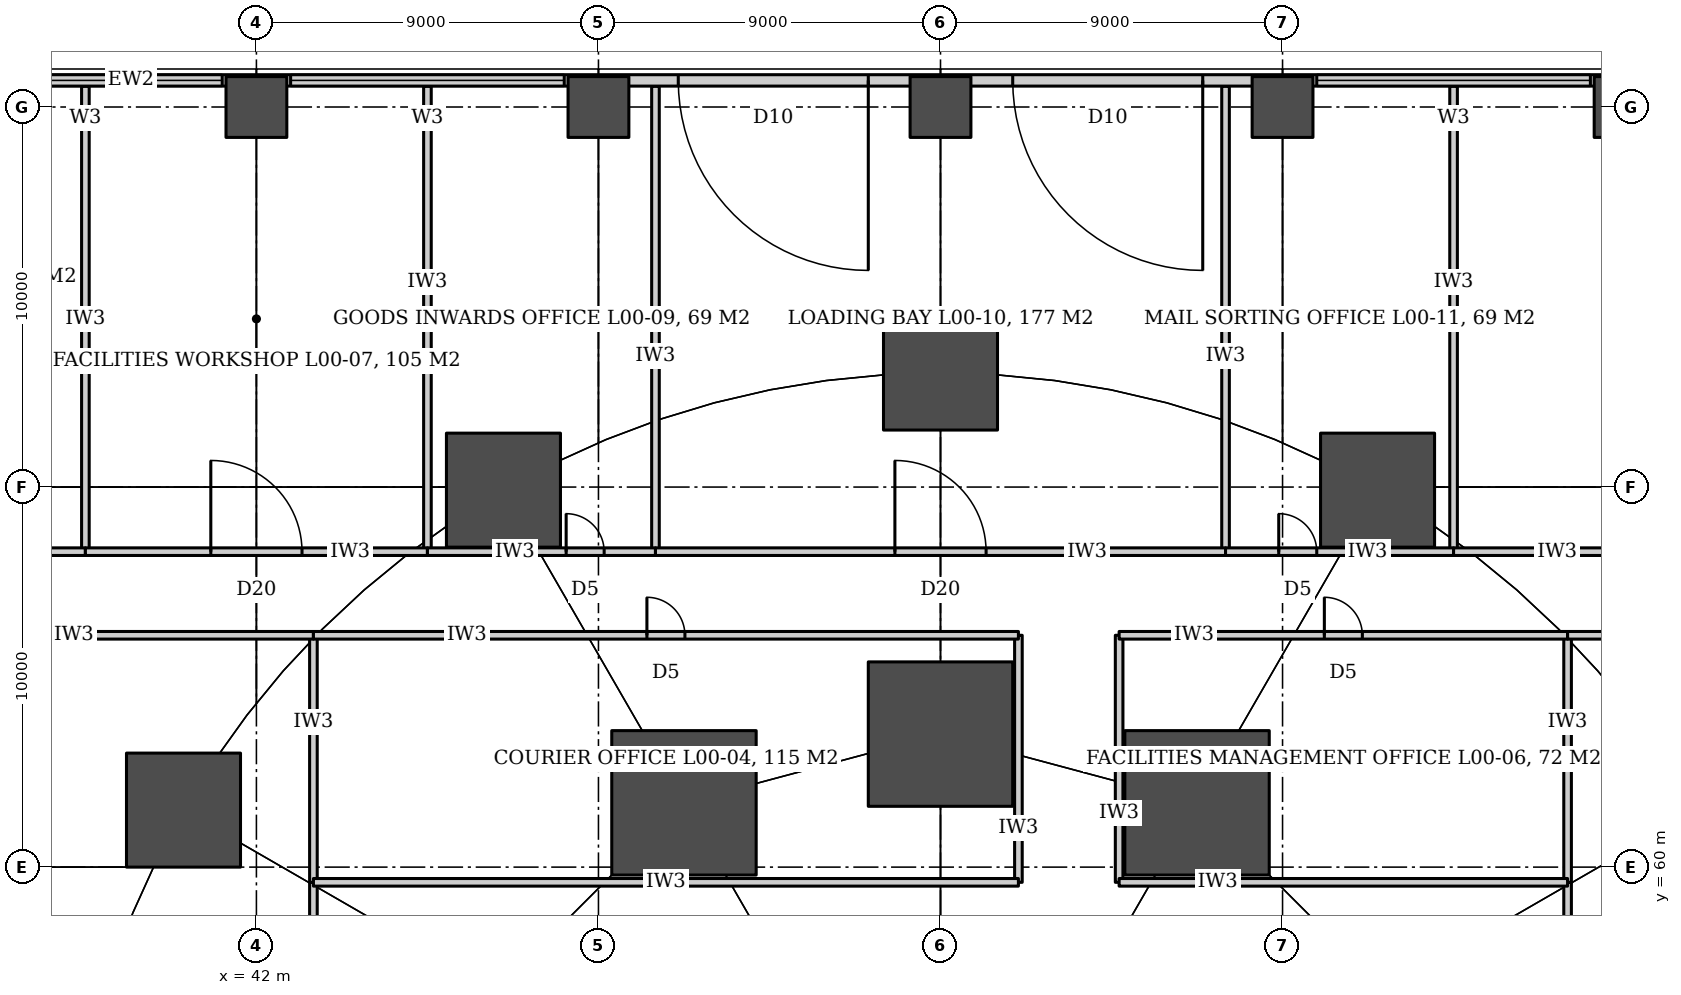
"""IFC4 building model, lengths in metres.
Left out: names, types, materials, properties, quantities, classifications, styles, units other than length and angle.
Written with IfcOpenShell. Run it as: python <this file> out.ifc"""

import sys

from ifc_helpers import new_model, si_unit, direction, frame, frame_2d, origin, origin_2d, place, context, subcontext, project, spatial, rectangle, circle, extrude, element, fill, save


model = new_model("IFC4")
c1 = context("Model", 3, precision=1e-05, world=origin(), true_north=direction((0.0, 1.0)))
c2 = subcontext(c1, "Body", "Model", "MODEL_VIEW")
j1 = project(units=[si_unit("LENGTHUNIT", "METRE"), si_unit("PLANEANGLEUNIT", "RADIAN")], contexts=[c1])
p1 = place(None, origin())
s1 = spatial("IfcSite", under=j1, at=p1, CompositionType="ELEMENT")
p2 = place(p1, origin())
s2 = spatial("IfcBuilding", under=s1, at=p2, CompositionType="ELEMENT")
p3 = place(p2, origin())
s3 = spatial("IfcBuildingStorey", under=s2, at=p3, CompositionType="ELEMENT", Elevation=0.0)
for number, where, z_axis, x_axis in (
    (1, (42.0, 80.0, 0.0), (0.0, 0.0, 1.0), (1.0, 0.0, 0.0)),
    (2, (51.0, 80.0, 0.0), (0.0, 0.0, 1.0), (1.0, 0.0, 0.0)),
    (3, (60.0, 80.0, 0.0), (0.0, 0.0, 1.0), (1.0, 0.0, 0.0)),
    (4, (69.0, 80.0, 0.0), (0.0, 0.0, 1.0), (1.0, 0.0, 0.0)),
    (5, (78.0, 80.0, 0.0), (0.0, 0.0, 1.0), (1.0, 0.0, 0.0)),
):
    element("IfcColumn", number, at=place(p3, frame(where, z_axis=z_axis, x_axis=x_axis)), inside=s3, PredefinedType="COLUMN", context=c2, shape_type="SweptSolid", body=[
        extrude(rectangle(XDim=1.6, YDim=1.6, at=origin_2d()), origin(), (0.0, 0.0, 1.0), 6.0),
    ])
for number, where, z_axis, x_axis in (
    (6, (71.5, 69.919, 0.0), (0.0, 0.0, 1.0), (1.0, 0.0, 0.0)),
    (7, (60.0, 73.0, 0.0), (0.0, 0.0, 1.0), (1.0, 0.0, 0.0)),
    (8, (48.5, 69.919, 0.0), (0.0, 0.0, 1.0), (1.0, 0.0, 0.0)),
    (9, (40.081, 61.5, 0.0), (0.0, 0.0, 1.0), (1.0, 0.0, 0.0)),
):
    element("IfcColumn", number, at=place(p3, frame(where, z_axis=z_axis, x_axis=x_axis)), inside=s3, PredefinedType="COLUMN", context=c2, shape_type="SweptSolid", body=[
        extrude(circle(Radius=1.5, at=origin_2d()), origin(), (0.0, 0.0, 1.0), 6.0),
    ])
for number, where, z_axis, x_axis in (
    (10, (66.75, 61.691, 0.0), (0.0, 0.0, 1.0), (1.0, 0.0, 0.0)),
    (11, (60.0, 63.5, 0.0), (0.0, 0.0, 1.0), (1.0, 0.0, 0.0)),
    (12, (53.25, 61.691, 0.0), (0.0, 0.0, 1.0), (1.0, 0.0, 0.0)),
):
    element("IfcColumn", number, at=place(p3, frame(where, z_axis=z_axis, x_axis=x_axis)), inside=s3, PredefinedType="COLUMN", context=c2, shape_type="SweptSolid", body=[
        extrude(circle(Radius=1.9, at=origin_2d()), origin(), (0.0, 0.0, 1.0), 6.0),
    ])
p4 = place(p3, frame((37.5, 68.3, 0.0), z_axis=(0.0, 0.0, 1.0), x_axis=(0.0, 1.0, 0.0)))
e13 = element("IfcWall", 13, at=p4, inside=s3, PredefinedType="PARTITIONING", context=c2, shape_type="SweptSolid", body=[
    extrude(rectangle(XDim=12.245, YDim=0.2, at=frame_2d((6.123, 0.0))), origin(), (0.0, 0.0, 1.0), 3.68),
])
p5 = place(p3, frame((43.5, 48.35, 0.0), z_axis=(0.0, 0.0, 1.0), x_axis=(0.0, 1.0, 0.0)))
e14 = element("IfcWall", 14, at=p5, inside=s3, PredefinedType="PARTITIONING", context=c2, shape_type="SweptSolid", body=[
    extrude(rectangle(XDim=11.25, YDim=0.2, at=frame_2d((5.625, 0.0))), origin(), (0.0, 0.0, 1.0), 3.08),
])
p6 = place(p3, frame((43.5, 59.6, 0.0), z_axis=(0.0, 0.0, 1.0), x_axis=(0.0, 1.0, 0.0)))
e15 = element("IfcWall", 15, at=p6, inside=s3, PredefinedType="PARTITIONING", context=c2, shape_type="SweptSolid", body=[
    extrude(rectangle(XDim=6.5, YDim=0.2, at=frame_2d((3.25, 0.0))), origin(), (0.0, 0.0, 1.0), 3.08),
])
for number, where, z_axis, x_axis in (
    (16, (46.5, 68.3, 0.0), (0.0, 0.0, 1.0), (0.0, 1.0, 0.0)),
    (17, (52.5, 68.3, 0.0), (0.0, 0.0, 1.0), (0.0, 1.0, 0.0)),
):
    element("IfcWall", number, at=place(p3, frame(where, z_axis=z_axis, x_axis=x_axis)), inside=s3, PredefinedType="PARTITIONING", context=c2, shape_type="SweptSolid", body=[
        extrude(rectangle(XDim=12.245, YDim=0.2, at=frame_2d((6.123, 0.0))), origin(), (0.0, 0.0, 1.0), 3.68),
    ])
p7 = place(p3, frame((62.05, 59.6, 0.0), z_axis=(0.0, 0.0, 1.0), x_axis=(0.0, 1.0, 0.0)))
e18 = element("IfcWall", 18, at=p7, inside=s3, PredefinedType="PARTITIONING", context=c2, shape_type="SweptSolid", body=[
    extrude(rectangle(XDim=6.5, YDim=0.2, at=frame_2d((3.25, 0.0))), origin(), (0.0, 0.0, 1.0), 3.08),
])
p8 = place(p3, frame((64.7, 59.6, 0.0), z_axis=(0.0, 0.0, 1.0), x_axis=(0.0, 1.0, 0.0)))
e19 = element("IfcWall", 19, at=p8, inside=s3, PredefinedType="PARTITIONING", context=c2, shape_type="SweptSolid", body=[
    extrude(rectangle(XDim=6.5, YDim=0.2, at=frame_2d((3.25, 0.0))), origin(), (0.0, 0.0, 1.0), 2.48),
])
for number, where, z_axis, x_axis in (
    (20, (67.5, 68.3, 0.0), (0.0, 0.0, 1.0), (0.0, 1.0, 0.0)),
    (21, (73.5, 68.3, 0.0), (0.0, 0.0, 1.0), (0.0, 1.0, 0.0)),
):
    element("IfcWall", number, at=place(p3, frame(where, z_axis=z_axis, x_axis=x_axis)), inside=s3, PredefinedType="PARTITIONING", context=c2, shape_type="SweptSolid", body=[
        extrude(rectangle(XDim=12.245, YDim=0.2, at=frame_2d((6.123, 0.0))), origin(), (0.0, 0.0, 1.0), 3.68),
    ])
p9 = place(p3, frame((76.5, 48.35, 0.0), z_axis=(0.0, 0.0, 1.0), x_axis=(0.0, 1.0, 0.0)))
e22 = element("IfcWall", 22, at=p9, inside=s3, PredefinedType="PARTITIONING", context=c2, shape_type="SweptSolid", body=[
    extrude(rectangle(XDim=11.25, YDim=0.2, at=frame_2d((5.625, 0.0))), origin(), (0.0, 0.0, 1.0), 3.08),
])
p10 = place(p3, frame((76.5, 59.6, 0.0), z_axis=(0.0, 0.0, 1.0), x_axis=(0.0, 1.0, 0.0)))
e23 = element("IfcWall", 23, at=p10, inside=s3, PredefinedType="PARTITIONING", context=c2, shape_type="SweptSolid", body=[
    extrude(rectangle(XDim=6.5, YDim=0.2, at=frame_2d((3.25, 0.0))), origin(), (0.0, 0.0, 1.0), 3.08),
])
p11 = place(p3, frame((43.5, 59.6, 0.0), z_axis=(0.0, 0.0, 1.0), x_axis=(1.0, 0.0, 0.0)))
e24 = element("IfcWall", 24, at=p11, inside=s3, PredefinedType="PARTITIONING", context=c2, shape_type="SweptSolid", body=[
    extrude(rectangle(XDim=18.55, YDim=0.2, at=frame_2d((9.275, 0.0))), origin(), (0.0, 0.0, 1.0), 2.48),
])
p12 = place(p3, frame((64.7, 59.6, 0.0), z_axis=(0.0, 0.0, 1.0), x_axis=(1.0, 0.0, 0.0)))
e25 = element("IfcWall", 25, at=p12, inside=s3, PredefinedType="PARTITIONING", context=c2, shape_type="SweptSolid", body=[
    extrude(rectangle(XDim=11.8, YDim=0.2, at=frame_2d((5.9, 0.0))), origin(), (0.0, 0.0, 1.0), 2.48),
])
p13 = place(p3, frame((30.9, 66.1, 0.0), z_axis=(0.0, 0.0, 1.0), x_axis=(1.0, 0.0, 0.0)))
e26 = element("IfcWall", 26, at=p13, inside=s3, PredefinedType="PARTITIONING", context=c2, shape_type="SweptSolid", body=[
    extrude(rectangle(XDim=12.6, YDim=0.2, at=frame_2d((6.3, 0.0))), origin(), (0.0, 0.0, 1.0), 3.68),
])
p14 = place(p3, frame((43.5, 66.1, 0.0), z_axis=(0.0, 0.0, 1.0), x_axis=(1.0, 0.0, 0.0)))
e27 = element("IfcWall", 27, at=p14, inside=s3, PredefinedType="PARTITIONING", context=c2, shape_type="SweptSolid", body=[
    extrude(rectangle(XDim=18.55, YDim=0.2, at=frame_2d((9.275, 0.0))), origin(), (0.0, 0.0, 1.0), 3.08),
])
p15 = place(p14, frame((8.775, 0.0, 0.0)))
e28 = element("IfcOpeningElement", 28, at=p15, cuts=e27, PredefinedType="OPENING", context=c2, shape_type="SweptSolid", body=[
    extrude(rectangle(XDim=1.0, YDim=2.1, at=frame_2d((0.5, 1.05))), frame((0.0, 0.11, 0.0), z_axis=(0.0, -1.0, 0.0), x_axis=(1.0, 0.0, 0.0)), (0.0, 0.0, 1.0), 0.22),
])
p16 = place(p3, frame((64.7, 66.1, 0.0), z_axis=(0.0, 0.0, 1.0), x_axis=(1.0, 0.0, 0.0)))
e29 = element("IfcWall", 29, at=p16, inside=s3, PredefinedType="PARTITIONING", context=c2, shape_type="SweptSolid", body=[
    extrude(rectangle(XDim=11.8, YDim=0.2, at=frame_2d((5.9, 0.0))), origin(), (0.0, 0.0, 1.0), 3.08),
])
p17 = place(p16, frame((5.4, 0.0, 0.0)))
e30 = element("IfcOpeningElement", 30, at=p17, cuts=e29, PredefinedType="OPENING", context=c2, shape_type="SweptSolid", body=[
    extrude(rectangle(XDim=1.0, YDim=2.1, at=frame_2d((0.5, 1.05))), frame((0.0, 0.11, 0.0), z_axis=(0.0, -1.0, 0.0), x_axis=(1.0, 0.0, 0.0)), (0.0, 0.0, 1.0), 0.22),
])
p18 = place(p3, frame((76.5, 66.1, 0.0), z_axis=(0.0, 0.0, 1.0), x_axis=(1.0, 0.0, 0.0)))
e31 = element("IfcWall", 31, at=p18, inside=s3, PredefinedType="PARTITIONING", context=c2, shape_type="SweptSolid", body=[
    extrude(rectangle(XDim=12.6, YDim=0.2, at=frame_2d((6.3, 0.0))), origin(), (0.0, 0.0, 1.0), 3.68),
])
p19 = place(p3, frame((28.5, 68.3, 0.0), z_axis=(0.0, 0.0, 1.0), x_axis=(1.0, 0.0, 0.0)))
e32 = element("IfcWall", 32, at=p19, inside=s3, PredefinedType="PARTITIONING", context=c2, shape_type="SweptSolid", body=[
    extrude(rectangle(XDim=9.0, YDim=0.2, at=frame_2d((4.5, 0.0))), origin(), (0.0, 0.0, 1.0), 3.68),
])
p20 = place(p19, frame((5.4, 0.0, 0.0)))
e33 = element("IfcOpeningElement", 33, at=p20, cuts=e32, PredefinedType="OPENING", context=c2, shape_type="SweptSolid", body=[
    extrude(rectangle(XDim=1.0, YDim=2.1, at=frame_2d((0.5, 1.05))), frame((0.0, 0.11, 0.0), z_axis=(0.0, -1.0, 0.0), x_axis=(1.0, 0.0, 0.0)), (0.0, 0.0, 1.0), 0.22),
])
p21 = place(p3, frame((37.5, 68.3, 0.0), z_axis=(0.0, 0.0, 1.0), x_axis=(1.0, 0.0, 0.0)))
e34 = element("IfcWall", 34, at=p21, inside=s3, PredefinedType="PARTITIONING", context=c2, shape_type="SweptSolid", body=[
    extrude(rectangle(XDim=9.0, YDim=0.2, at=frame_2d((4.5, 0.0))), origin(), (0.0, 0.0, 1.0), 3.68),
])
p22 = place(p21, frame((3.3, 0.0, 0.0)))
e35 = element("IfcOpeningElement", 35, at=p22, cuts=e34, PredefinedType="OPENING", context=c2, shape_type="SweptSolid", body=[
    extrude(rectangle(XDim=2.4, YDim=2.7, at=frame_2d((1.2, 1.35))), frame((0.0, 0.11, 0.0), z_axis=(0.0, -1.0, 0.0), x_axis=(1.0, 0.0, 0.0)), (0.0, 0.0, 1.0), 0.22),
])
p23 = place(p3, frame((46.5, 68.3, 0.0), z_axis=(0.0, 0.0, 1.0), x_axis=(1.0, 0.0, 0.0)))
e36 = element("IfcWall", 36, at=p23, inside=s3, PredefinedType="PARTITIONING", context=c2, shape_type="SweptSolid", body=[
    extrude(rectangle(XDim=6.0, YDim=0.2, at=frame_2d((3.0, 0.0))), origin(), (0.0, 0.0, 1.0), 3.08),
])
p24 = place(p23, frame((3.65, 0.0, 0.0)))
e37 = element("IfcOpeningElement", 37, at=p24, cuts=e36, PredefinedType="OPENING", context=c2, shape_type="SweptSolid", body=[
    extrude(rectangle(XDim=1.0, YDim=2.1, at=frame_2d((0.5, 1.05))), frame((0.0, 0.11, 0.0), z_axis=(0.0, -1.0, 0.0), x_axis=(1.0, 0.0, 0.0)), (0.0, 0.0, 1.0), 0.22),
])
p25 = place(p3, frame((52.5, 68.3, 0.0), z_axis=(0.0, 0.0, 1.0), x_axis=(1.0, 0.0, 0.0)))
e38 = element("IfcWall", 38, at=p25, inside=s3, PredefinedType="PARTITIONING", context=c2, shape_type="SweptSolid", body=[
    extrude(rectangle(XDim=15.0, YDim=0.2, at=frame_2d((7.5, 0.0))), origin(), (0.0, 0.0, 1.0), 3.08),
])
p26 = place(p25, frame((6.3, 0.0, 0.0)))
e39 = element("IfcOpeningElement", 39, at=p26, cuts=e38, PredefinedType="OPENING", context=c2, shape_type="SweptSolid", body=[
    extrude(rectangle(XDim=2.4, YDim=2.7, at=frame_2d((1.2, 1.35))), frame((0.0, 0.11, 0.0), z_axis=(0.0, -1.0, 0.0), x_axis=(1.0, 0.0, 0.0)), (0.0, 0.0, 1.0), 0.22),
])
p27 = place(p3, frame((67.5, 68.3, 0.0), z_axis=(0.0, 0.0, 1.0), x_axis=(1.0, 0.0, 0.0)))
e40 = element("IfcWall", 40, at=p27, inside=s3, PredefinedType="PARTITIONING", context=c2, shape_type="SweptSolid", body=[
    extrude(rectangle(XDim=6.0, YDim=0.2, at=frame_2d((3.0, 0.0))), origin(), (0.0, 0.0, 1.0), 3.08),
])
p28 = place(p27, frame((1.4, 0.0, 0.0)))
e41 = element("IfcOpeningElement", 41, at=p28, cuts=e40, PredefinedType="OPENING", context=c2, shape_type="SweptSolid", body=[
    extrude(rectangle(XDim=1.0, YDim=2.1, at=frame_2d((0.5, 1.05))), frame((0.0, 0.11, 0.0), z_axis=(0.0, -1.0, 0.0), x_axis=(1.0, 0.0, 0.0)), (0.0, 0.0, 1.0), 0.22),
])
p29 = place(p3, frame((73.5, 68.3, 0.0), z_axis=(0.0, 0.0, 1.0), x_axis=(1.0, 0.0, 0.0)))
e42 = element("IfcWall", 42, at=p29, inside=s3, PredefinedType="PARTITIONING", context=c2, shape_type="SweptSolid", body=[
    extrude(rectangle(XDim=18.0, YDim=0.2, at=frame_2d((9.0, 0.0))), origin(), (0.0, 0.0, 1.0), 3.68),
])
p30 = place(p29, frame((8.5, 0.0, 0.0)))
e43 = element("IfcOpeningElement", 43, at=p30, cuts=e42, PredefinedType="OPENING", context=c2, shape_type="SweptSolid", body=[
    extrude(rectangle(XDim=1.0, YDim=2.1, at=frame_2d((0.5, 1.05))), frame((0.0, 0.11, 0.0), z_axis=(0.0, -1.0, 0.0), x_axis=(1.0, 0.0, 0.0)), (0.0, 0.0, 1.0), 0.22),
])
p31 = place(p3, frame((95.0, 80.7, 0.0), z_axis=(0.0, 0.0, 1.0), x_axis=(-1.0, 0.0, 0.0)))
e44 = element("IfcWall", 44, at=p31, inside=s3, PredefinedType="SOLIDWALL", context=c2, shape_type="SweptSolid", body=[
    extrude(rectangle(XDim=70.0, YDim=0.3, at=frame_2d((35.0, 0.0))), origin(), (0.0, 0.0, 1.0), 5.7),
])
p32 = place(p31, frame((53.9, 0.0, 0.6)))
e45 = element("IfcOpeningElement", 45, at=p32, cuts=e44, PredefinedType="OPENING", context=c2, shape_type="SweptSolid", body=[
    extrude(rectangle(XDim=7.2, YDim=3.6, at=frame_2d((3.6, 1.8))), frame((0.0, 0.16, 0.0), z_axis=(0.0, -1.0, 0.0), x_axis=(1.0, 0.0, 0.0)), (0.0, 0.0, 1.0), 0.32),
])
p33 = place(p31, frame((44.9, 0.0, 0.6)))
e46 = element("IfcOpeningElement", 46, at=p33, cuts=e44, PredefinedType="OPENING", context=c2, shape_type="SweptSolid", body=[
    extrude(rectangle(XDim=7.2, YDim=3.6, at=frame_2d((3.6, 1.8))), frame((0.0, 0.16, 0.0), z_axis=(0.0, -1.0, 0.0), x_axis=(1.0, 0.0, 0.0)), (0.0, 0.0, 1.0), 0.32),
])
p34 = place(p31, frame((36.9, 0.0, 0.0)))
e47 = element("IfcOpeningElement", 47, at=p34, cuts=e44, PredefinedType="OPENING", context=c2, shape_type="SweptSolid", body=[
    extrude(rectangle(XDim=5.0, YDim=4.5, at=frame_2d((2.5, 2.25))), frame((0.0, 0.16, 0.0), z_axis=(0.0, -1.0, 0.0), x_axis=(1.0, 0.0, 0.0)), (0.0, 0.0, 1.0), 0.32),
])
p35 = place(p31, frame((28.1, 0.0, 0.0)))
e48 = element("IfcOpeningElement", 48, at=p35, cuts=e44, PredefinedType="OPENING", context=c2, shape_type="SweptSolid", body=[
    extrude(rectangle(XDim=5.0, YDim=4.5, at=frame_2d((2.5, 2.25))), frame((0.0, 0.16, 0.0), z_axis=(0.0, -1.0, 0.0), x_axis=(1.0, 0.0, 0.0)), (0.0, 0.0, 1.0), 0.32),
])
p36 = place(p31, frame((17.9, 0.0, 0.6)))
e49 = element("IfcOpeningElement", 49, at=p36, cuts=e44, PredefinedType="OPENING", context=c2, shape_type="SweptSolid", body=[
    extrude(rectangle(XDim=7.2, YDim=3.6, at=frame_2d((3.6, 1.8))), frame((0.0, 0.16, 0.0), z_axis=(0.0, -1.0, 0.0), x_axis=(1.0, 0.0, 0.0)), (0.0, 0.0, 1.0), 0.32),
])
p37 = place(p31, frame((8.9, 0.0, 0.6)))
e50 = element("IfcOpeningElement", 50, at=p37, cuts=e44, PredefinedType="OPENING", context=c2, shape_type="SweptSolid", body=[
    extrude(rectangle(XDim=7.2, YDim=3.6, at=frame_2d((3.6, 1.8))), frame((0.0, 0.16, 0.0), z_axis=(0.0, -1.0, 0.0), x_axis=(1.0, 0.0, 0.0)), (0.0, 0.0, 1.0), 0.32),
])
p38 = place(p31, frame((0.8, 0.0, 0.0)))
e51 = element("IfcOpeningElement", 51, at=p38, cuts=e44, PredefinedType="OPENING", context=c2, shape_type="SweptSolid", body=[
    extrude(rectangle(XDim=2.0, YDim=3.0, at=frame_2d((1.0, 1.5))), frame((0.0, 0.16, 0.0), z_axis=(0.0, -1.0, 0.0), x_axis=(1.0, 0.0, 0.0)), (0.0, 0.0, 1.0), 0.32),
])
p39 = place(p22, origin())
e52 = element("IfcDoor", 52, at=p39, inside=s3, OperationType="DOUBLE_DOOR_DOUBLE_SWING", PredefinedType="DOOR", context=c2, shape_type="SweptSolid", body=[
    extrude(rectangle(XDim=2.4, YDim=2.7, at=frame_2d((1.2, 1.35))), frame((0.0, 0.025, 0.0), z_axis=(0.0, -1.0, 0.0), x_axis=(1.0, 0.0, 0.0)), (0.0, 0.0, 1.0), 0.05),
])
fill(e35, e52)
p40 = place(p24, origin())
e53 = element("IfcDoor", 53, at=p40, inside=s3, OperationType="SINGLE_SWING_LEFT", PredefinedType="DOOR", context=c2, shape_type="SweptSolid", body=[
    extrude(rectangle(XDim=1.0, YDim=2.1, at=frame_2d((0.5, 1.05))), frame((0.0, 0.025, 0.0), z_axis=(0.0, -1.0, 0.0), x_axis=(1.0, 0.0, 0.0)), (0.0, 0.0, 1.0), 0.05),
])
fill(e37, e53)
p41 = place(p26, origin())
e54 = element("IfcDoor", 54, at=p41, inside=s3, OperationType="DOUBLE_DOOR_DOUBLE_SWING", PredefinedType="DOOR", context=c2, shape_type="SweptSolid", body=[
    extrude(rectangle(XDim=2.4, YDim=2.7, at=frame_2d((1.2, 1.35))), frame((0.0, 0.025, 0.0), z_axis=(0.0, -1.0, 0.0), x_axis=(1.0, 0.0, 0.0)), (0.0, 0.0, 1.0), 0.05),
])
fill(e39, e54)
p42 = place(p28, origin())
e55 = element("IfcDoor", 55, at=p42, inside=s3, OperationType="SINGLE_SWING_LEFT", PredefinedType="DOOR", context=c2, shape_type="SweptSolid", body=[
    extrude(rectangle(XDim=1.0, YDim=2.1, at=frame_2d((0.5, 1.05))), frame((0.0, 0.025, 0.0), z_axis=(0.0, -1.0, 0.0), x_axis=(1.0, 0.0, 0.0)), (0.0, 0.0, 1.0), 0.05),
])
fill(e41, e55)
p43 = place(p15, origin())
e56 = element("IfcDoor", 56, at=p43, inside=s3, OperationType="SINGLE_SWING_LEFT", PredefinedType="DOOR", context=c2, shape_type="SweptSolid", body=[
    extrude(rectangle(XDim=1.0, YDim=2.1, at=frame_2d((0.5, 1.05))), frame((0.0, 0.025, 0.0), z_axis=(0.0, -1.0, 0.0), x_axis=(1.0, 0.0, 0.0)), (0.0, 0.0, 1.0), 0.05),
])
fill(e28, e56)
p44 = place(p17, origin())
e57 = element("IfcDoor", 57, at=p44, inside=s3, OperationType="SINGLE_SWING_LEFT", PredefinedType="DOOR", context=c2, shape_type="SweptSolid", body=[
    extrude(rectangle(XDim=1.0, YDim=2.1, at=frame_2d((0.5, 1.05))), frame((0.0, 0.025, 0.0), z_axis=(0.0, -1.0, 0.0), x_axis=(1.0, 0.0, 0.0)), (0.0, 0.0, 1.0), 0.05),
])
fill(e30, e57)
p45 = place(p32, origin())
e58 = element("IfcWindow", 58, at=p45, inside=s3, PartitioningType="SINGLE_PANEL", PredefinedType="WINDOW", context=c2, shape_type="SweptSolid", body=[
    extrude(rectangle(XDim=7.2, YDim=3.6, at=frame_2d((3.6, 1.8))), frame((0.0, 0.03, 0.0), z_axis=(0.0, -1.0, 0.0), x_axis=(1.0, 0.0, 0.0)), (0.0, 0.0, 1.0), 0.06),
])
fill(e45, e58)
p46 = place(p33, origin())
e59 = element("IfcWindow", 59, at=p46, inside=s3, PartitioningType="SINGLE_PANEL", PredefinedType="WINDOW", context=c2, shape_type="SweptSolid", body=[
    extrude(rectangle(XDim=7.2, YDim=3.6, at=frame_2d((3.6, 1.8))), frame((0.0, 0.03, 0.0), z_axis=(0.0, -1.0, 0.0), x_axis=(1.0, 0.0, 0.0)), (0.0, 0.0, 1.0), 0.06),
])
fill(e46, e59)
p47 = place(p34, origin())
e60 = element("IfcDoor", 60, at=p47, inside=s3, OperationType="USERDEFINED", PredefinedType="DOOR", context=c2, shape_type="SweptSolid", body=[
    extrude(rectangle(XDim=5.0, YDim=4.5, at=frame_2d((2.5, 2.25))), frame((0.0, 0.025, 0.0), z_axis=(0.0, -1.0, 0.0), x_axis=(1.0, 0.0, 0.0)), (0.0, 0.0, 1.0), 0.05),
])
fill(e47, e60)
p48 = place(p35, origin())
e61 = element("IfcDoor", 61, at=p48, inside=s3, OperationType="USERDEFINED", PredefinedType="DOOR", context=c2, shape_type="SweptSolid", body=[
    extrude(rectangle(XDim=5.0, YDim=4.5, at=frame_2d((2.5, 2.25))), frame((0.0, 0.025, 0.0), z_axis=(0.0, -1.0, 0.0), x_axis=(1.0, 0.0, 0.0)), (0.0, 0.0, 1.0), 0.05),
])
fill(e48, e61)
p49 = place(p36, origin())
e62 = element("IfcWindow", 62, at=p49, inside=s3, PartitioningType="SINGLE_PANEL", PredefinedType="WINDOW", context=c2, shape_type="SweptSolid", body=[
    extrude(rectangle(XDim=7.2, YDim=3.6, at=frame_2d((3.6, 1.8))), frame((0.0, 0.03, 0.0), z_axis=(0.0, -1.0, 0.0), x_axis=(1.0, 0.0, 0.0)), (0.0, 0.0, 1.0), 0.06),
])
fill(e49, e62)
save(model, sys.argv[1])
